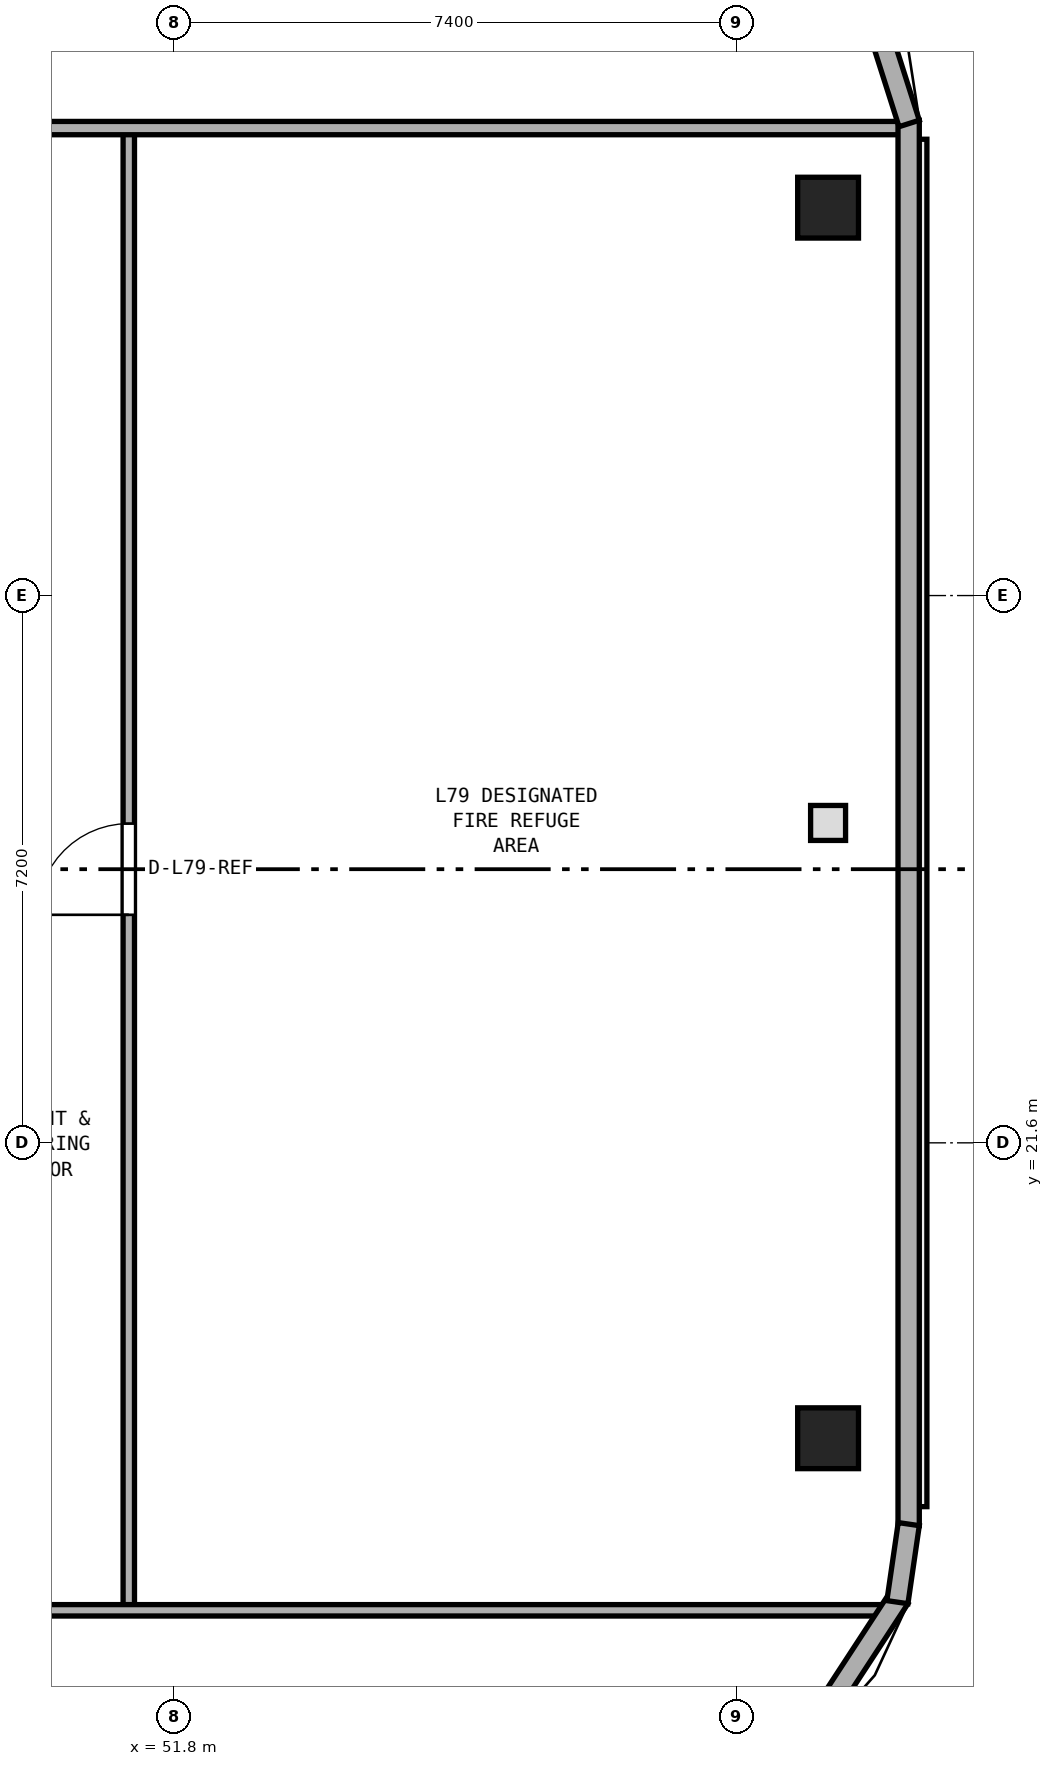
"""IFC4 building model, lengths in metres.
Left out: names, types, materials, properties, quantities, classifications, styles, units other than length and angle.
Written with IfcOpenShell. Run it as: python <this file> out.ifc"""

import sys

from ifc_helpers import new_model, si_unit, direction, frame, frame_2d, origin, origin_2d, place, context, subcontext, project, spatial, rectangle, extrude, element, fill, save


model = new_model("IFC4")
c1 = context("Model", 3, precision=1e-05, world=origin(), true_north=direction((0.0, 1.0)))
c2 = subcontext(c1, "Body", "Model", "MODEL_VIEW")
j1 = project(units=[si_unit("LENGTHUNIT", "METRE"), si_unit("PLANEANGLEUNIT", "RADIAN")], contexts=[c1])
p1 = place(None, origin())
s1 = spatial("IfcSite", under=j1, at=p1, CompositionType="ELEMENT")
p2 = place(p1, origin())
s2 = spatial("IfcBuilding", under=s1, at=p2, CompositionType="ELEMENT")
p3 = place(p2, frame((0.0, 0.0, 308.6)))
s3 = spatial("IfcBuildingStorey", under=s2, at=p3, CompositionType="ELEMENT", Elevation=308.6)
for number, where, z_axis, x_axis in (
    (1, (60.4, 17.714, 0.0), (0.0, 0.0, 1.0), (1.0, 0.0, 0.0)),
    (2, (60.4, 33.903, 0.0), (0.0, 0.0, 1.0), (1.0, 0.0, 0.0)),
):
    element("IfcColumn", number, at=place(p3, frame(where, z_axis=z_axis, x_axis=x_axis)), inside=s3, PredefinedType="COLUMN", context=c2, shape_type="SweptSolid", body=[
        extrude(rectangle(XDim=0.8, YDim=0.8, at=origin_2d()), origin(), (0.0, 0.0, 1.0), 4.8),
    ])
p4 = place(p3, frame((51.2, 15.45, 0.0), z_axis=(0.0, 0.0, 1.0), x_axis=(0.0, 1.0, 0.0)))
e3 = element("IfcWall", 3, at=p4, inside=s3, PredefinedType="PARTITIONING", context=c2, shape_type="SweptSolid", body=[
    extrude(rectangle(XDim=19.5, YDim=0.15, at=frame_2d((9.75, 0.0))), origin(), (0.0, 0.0, 1.0), 4.52),
])
p5 = place(p4, frame((9.15, 0.0, 0.0)))
e4 = element("IfcOpeningElement", 4, at=p5, cuts=e3, PredefinedType="OPENING", context=c2, shape_type="SweptSolid", body=[
    extrude(rectangle(XDim=1.2, YDim=2.15, at=frame_2d((0.6, 1.075))), frame((0.0, 0.085, 0.0), z_axis=(0.0, -1.0, 0.0), x_axis=(1.0, 0.0, 0.0)), (0.0, 0.0, 1.0), 0.17),
])
p6 = place(p3, frame((14.129, 15.45, 0.0), z_axis=(0.0, 0.0, 1.0), x_axis=(1.0, 0.0, 0.0)))
e5 = element("IfcWall", 5, at=p6, inside=s3, PredefinedType="PARTITIONING", context=c2, shape_type="SweptSolid", body=[
    extrude(rectangle(XDim=47.076, YDim=0.15, at=frame_2d((23.538, 0.0))), origin(), (0.0, 0.0, 1.0), 2.12),
])
p7 = place(p6, frame((22.371, 0.0, 0.0)))
e6 = element("IfcOpeningElement", 6, at=p7, cuts=e5, PredefinedType="OPENING", context=c2, shape_type="SweptSolid", body=[
    extrude(rectangle(XDim=1.0, YDim=2.04, at=frame_2d((0.5, 1.02))), frame((0.0, 0.085, 0.0), z_axis=(0.0, -1.0, 0.0), x_axis=(1.0, 0.0, 0.0)), (0.0, 0.0, 1.0), 0.17),
])
p8 = place(p3, frame((14.408, 34.95, 0.0), z_axis=(0.0, 0.0, 1.0), x_axis=(1.0, 0.0, 0.0)))
e7 = element("IfcWall", 7, at=p8, inside=s3, PredefinedType="PARTITIONING", context=c2, shape_type="SweptSolid", body=[
    extrude(rectangle(XDim=46.987, YDim=0.175, at=frame_2d((23.494, 0.0))), origin(), (0.0, 0.0, 1.0), 2.12),
])
p9 = place(p8, frame((22.092, 0.0, 0.0)))
e8 = element("IfcOpeningElement", 8, at=p9, cuts=e7, PredefinedType="OPENING", context=c2, shape_type="SweptSolid", body=[
    extrude(rectangle(XDim=1.0, YDim=2.04, at=frame_2d((0.5, 1.02))), frame((0.0, 0.097, 0.0), z_axis=(0.0, -1.0, 0.0), x_axis=(1.0, 0.0, 0.0)), (0.0, 0.0, 1.0), 0.195),
])
p10 = place(p3, frame((61.46, 16.564, 0.0), z_axis=(0.0, 0.0, 1.0), x_axis=(0.0, 1.0, 0.0)))
e9 = element("IfcWall", 9, at=p10, inside=s3, PredefinedType="STANDARD", context=c2, shape_type="SweptSolid", body=[
    extrude(rectangle(XDim=18.489, YDim=0.28, at=frame_2d((9.245, 0.0))), origin(), (0.0, 0.0, 1.0), 4.52),
])
p11 = place(p3, frame((60.211, 13.894, 0.0), z_axis=(0.0, 0.0, 1.0), x_axis=(0.546663025999, 0.837352695109, 0.0)))
e10 = element("IfcWall", 10, at=p11, inside=s3, PredefinedType="STANDARD", context=c2, shape_type="SweptSolid", body=[
    extrude(rectangle(XDim=2.053, YDim=0.28, at=frame_2d((1.027, 0.0))), origin(), (0.0, 0.0, 1.0), 4.52),
])
p12 = place(p3, frame((61.312, 15.557, 0.0), z_axis=(0.0, 0.0, 1.0), x_axis=(0.144023647734, 0.989574246276, 0.0)))
e11 = element("IfcWall", 11, at=p12, inside=s3, PredefinedType="STANDARD", context=c2, shape_type="SweptSolid", body=[
    extrude(rectangle(XDim=1.037, YDim=0.28, at=frame_2d((0.519, 0.0))), origin(), (0.0, 0.0, 1.0), 4.52),
])
p13 = place(p3, frame((61.467, 35.01, 0.0), z_axis=(0.0, 0.0, 1.0), x_axis=(-0.303461906599, 0.952843571235, 0.0)))
e12 = element("IfcWall", 12, at=p13, inside=s3, PredefinedType="STANDARD", context=c2, shape_type="SweptSolid", body=[
    extrude(rectangle(XDim=2.185, YDim=0.28, at=frame_2d((1.093, 0.0))), origin(), (0.0, 0.0, 1.0), 4.52),
])
p14 = place(p5, origin())
e13 = element("IfcDoor", 13, at=p14, inside=s3, OperationType="SINGLE_SWING_LEFT", PredefinedType="DOOR", context=c2, shape_type="SweptSolid", body=[
    extrude(rectangle(XDim=1.2, YDim=2.15, at=frame_2d((0.6, 1.075))), frame((0.0, 0.025, 0.0), z_axis=(0.0, -1.0, 0.0), x_axis=(1.0, 0.0, 0.0)), (0.0, 0.0, 1.0), 0.05),
])
fill(e4, e13)
save(model, sys.argv[1])
